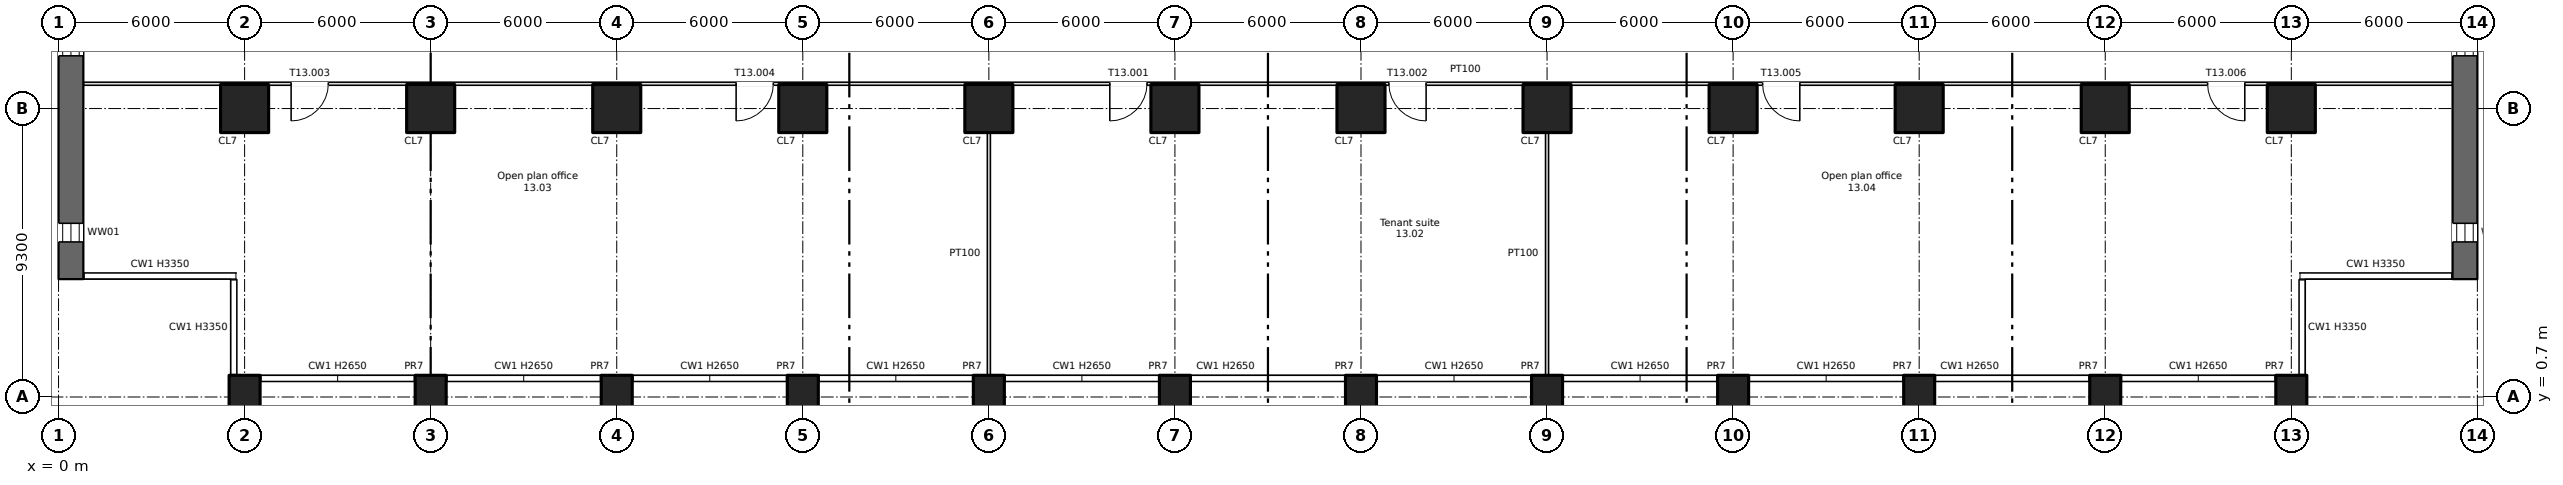
"""IFC4 building model, lengths in metres.
Left out: names, types, materials, properties, quantities, classifications, styles, units other than length and angle.
Written with IfcOpenShell. Run it as: python <this file> out.ifc"""

import sys

from ifc_helpers import new_model, si_unit, direction, frame, frame_2d, origin, origin_2d, place, context, subcontext, project, spatial, rectangle, extrude, element, fill, save


model = new_model("IFC4")
c1 = context("Model", 3, precision=1e-05, world=origin(), true_north=direction((0.0, 1.0)))
c2 = subcontext(c1, "Body", "Model", "MODEL_VIEW")
j1 = project(units=[si_unit("LENGTHUNIT", "METRE"), si_unit("PLANEANGLEUNIT", "RADIAN")], contexts=[c1])
p1 = place(None, origin())
s1 = spatial("IfcSite", under=j1, at=p1, CompositionType="ELEMENT")
p2 = place(p1, origin())
s2 = spatial("IfcBuilding", under=s1, at=p2, CompositionType="ELEMENT")
p3 = place(p2, frame((0.0, 0.0, 71.25)))
s3 = spatial("IfcBuildingStorey", under=s2, at=p3, CompositionType="ELEMENT", Elevation=71.25)
for number, where, z_axis, x_axis in (
    (1, (6.0, 0.7, -0.4), (0.0, 0.0, 1.0), (1.0, 0.0, 0.0)),
    (2, (12.0, 0.7, -0.4), (0.0, 0.0, 1.0), (1.0, 0.0, 0.0)),
    (3, (18.0, 0.7, -0.4), (0.0, 0.0, 1.0), (1.0, 0.0, 0.0)),
    (4, (24.0, 0.7, -0.4), (0.0, 0.0, 1.0), (1.0, 0.0, 0.0)),
    (5, (30.0, 0.7, -0.4), (0.0, 0.0, 1.0), (1.0, 0.0, 0.0)),
    (6, (36.0, 0.7, -0.4), (0.0, 0.0, 1.0), (1.0, 0.0, 0.0)),
    (7, (42.0, 0.7, -0.4), (0.0, 0.0, 1.0), (1.0, 0.0, 0.0)),
    (8, (48.0, 0.7, -0.4), (0.0, 0.0, 1.0), (1.0, 0.0, 0.0)),
    (9, (54.0, 0.7, -0.4), (0.0, 0.0, 1.0), (1.0, 0.0, 0.0)),
    (10, (60.0, 0.7, -0.4), (0.0, 0.0, 1.0), (1.0, 0.0, 0.0)),
    (11, (66.0, 0.7, -0.4), (0.0, 0.0, 1.0), (1.0, 0.0, 0.0)),
    (12, (72.0, 0.7, -0.4), (0.0, 0.0, 1.0), (1.0, 0.0, 0.0)),
):
    element("IfcColumn", number, at=place(p3, frame(where, z_axis=z_axis, x_axis=x_axis)), inside=s3, PredefinedType="COLUMN", context=c2, shape_type="SweptSolid", body=[
        extrude(rectangle(XDim=1.0, YDim=1.4, at=origin_2d()), origin(), (0.0, 0.0, 1.0), 3.75),
    ])
for number, where, z_axis, x_axis in (
    (13, (6.0, 10.0, 0.0), (0.0, 0.0, 1.0), (1.0, 0.0, 0.0)),
    (14, (12.0, 10.0, 0.0), (0.0, 0.0, 1.0), (1.0, 0.0, 0.0)),
    (15, (18.0, 10.0, 0.0), (0.0, 0.0, 1.0), (1.0, 0.0, 0.0)),
    (16, (24.0, 10.0, 0.0), (0.0, 0.0, 1.0), (1.0, 0.0, 0.0)),
    (17, (30.0, 10.0, 0.0), (0.0, 0.0, 1.0), (1.0, 0.0, 0.0)),
    (18, (36.0, 10.0, 0.0), (0.0, 0.0, 1.0), (1.0, 0.0, 0.0)),
    (19, (42.0, 10.0, 0.0), (0.0, 0.0, 1.0), (1.0, 0.0, 0.0)),
    (20, (48.0, 10.0, 0.0), (0.0, 0.0, 1.0), (1.0, 0.0, 0.0)),
    (21, (54.0, 10.0, 0.0), (0.0, 0.0, 1.0), (1.0, 0.0, 0.0)),
    (22, (60.0, 10.0, 0.0), (0.0, 0.0, 1.0), (1.0, 0.0, 0.0)),
    (23, (66.0, 10.0, 0.0), (0.0, 0.0, 1.0), (1.0, 0.0, 0.0)),
    (24, (72.0, 10.0, 0.0), (0.0, 0.0, 1.0), (1.0, 0.0, 0.0)),
):
    element("IfcColumn", number, at=place(p3, frame(where, z_axis=z_axis, x_axis=x_axis)), inside=s3, PredefinedType="COLUMN", context=c2, shape_type="SweptSolid", body=[
        extrude(rectangle(XDim=1.55, YDim=1.55, at=origin_2d()), origin(), (0.0, 0.0, 1.0), 3.35),
    ])
p4 = place(p3, frame((0.4, 4.5, 0.0), z_axis=(0.0, 0.0, 1.0), x_axis=(0.0, 1.0, 0.0)))
e25 = element("IfcWall", 25, at=p4, inside=s3, PredefinedType="SHEAR", context=c2, shape_type="SweptSolid", body=[
    extrude(rectangle(XDim=37.0, YDim=0.8, at=frame_2d((18.5, 0.0))), origin(), (0.0, 0.0, 1.0), 3.35),
])
p5 = place(p4, frame((1.2, 0.0, 0.6)))
e26 = element("IfcOpeningElement", 26, at=p5, cuts=e25, PredefinedType="OPENING", context=c2, shape_type="SweptSolid", body=[
    extrude(rectangle(XDim=0.6, YDim=2.4, at=frame_2d((0.3, 1.2))), frame((0.0, 0.41, 0.0), z_axis=(0.0, -1.0, 0.0), x_axis=(1.0, 0.0, 0.0)), (0.0, 0.0, 1.0), 0.82),
])
p6 = place(p4, frame((7.2, 0.0, 0.6)))
e27 = element("IfcOpeningElement", 27, at=p6, cuts=e25, PredefinedType="OPENING", context=c2, shape_type="SweptSolid", body=[
    extrude(rectangle(XDim=0.6, YDim=2.4, at=frame_2d((0.3, 1.2))), frame((0.0, 0.41, 0.0), z_axis=(0.0, -1.0, 0.0), x_axis=(1.0, 0.0, 0.0)), (0.0, 0.0, 1.0), 0.82),
])
p7 = place(p4, frame((13.2, 0.0, 0.6)))
e28 = element("IfcOpeningElement", 28, at=p7, cuts=e25, PredefinedType="OPENING", context=c2, shape_type="SweptSolid", body=[
    extrude(rectangle(XDim=0.6, YDim=2.4, at=frame_2d((0.3, 1.2))), frame((0.0, 0.41, 0.0), z_axis=(0.0, -1.0, 0.0), x_axis=(1.0, 0.0, 0.0)), (0.0, 0.0, 1.0), 0.82),
])
p8 = place(p4, frame((19.2, 0.0, 0.6)))
e29 = element("IfcOpeningElement", 29, at=p8, cuts=e25, PredefinedType="OPENING", context=c2, shape_type="SweptSolid", body=[
    extrude(rectangle(XDim=0.6, YDim=2.4, at=frame_2d((0.3, 1.2))), frame((0.0, 0.41, 0.0), z_axis=(0.0, -1.0, 0.0), x_axis=(1.0, 0.0, 0.0)), (0.0, 0.0, 1.0), 0.82),
])
p9 = place(p4, frame((25.2, 0.0, 0.6)))
e30 = element("IfcOpeningElement", 30, at=p9, cuts=e25, PredefinedType="OPENING", context=c2, shape_type="SweptSolid", body=[
    extrude(rectangle(XDim=0.6, YDim=2.4, at=frame_2d((0.3, 1.2))), frame((0.0, 0.41, 0.0), z_axis=(0.0, -1.0, 0.0), x_axis=(1.0, 0.0, 0.0)), (0.0, 0.0, 1.0), 0.82),
])
p10 = place(p4, frame((31.2, 0.0, 0.6)))
e31 = element("IfcOpeningElement", 31, at=p10, cuts=e25, PredefinedType="OPENING", context=c2, shape_type="SweptSolid", body=[
    extrude(rectangle(XDim=0.6, YDim=2.4, at=frame_2d((0.3, 1.2))), frame((0.0, 0.41, 0.0), z_axis=(0.0, -1.0, 0.0), x_axis=(1.0, 0.0, 0.0)), (0.0, 0.0, 1.0), 0.82),
])
p11 = place(p3, frame((77.6, 4.5, 0.0), z_axis=(0.0, 0.0, 1.0), x_axis=(0.0, 1.0, 0.0)))
e32 = element("IfcWall", 32, at=p11, inside=s3, PredefinedType="SHEAR", context=c2, shape_type="SweptSolid", body=[
    extrude(rectangle(XDim=37.0, YDim=0.8, at=frame_2d((18.5, 0.0))), origin(), (0.0, 0.0, 1.0), 3.35),
])
p12 = place(p11, frame((1.2, 0.0, 0.6)))
e33 = element("IfcOpeningElement", 33, at=p12, cuts=e32, PredefinedType="OPENING", context=c2, shape_type="SweptSolid", body=[
    extrude(rectangle(XDim=0.6, YDim=2.4, at=frame_2d((0.3, 1.2))), frame((0.0, 0.41, 0.0), z_axis=(0.0, -1.0, 0.0), x_axis=(1.0, 0.0, 0.0)), (0.0, 0.0, 1.0), 0.82),
])
p13 = place(p11, frame((7.2, 0.0, 0.6)))
e34 = element("IfcOpeningElement", 34, at=p13, cuts=e32, PredefinedType="OPENING", context=c2, shape_type="SweptSolid", body=[
    extrude(rectangle(XDim=0.6, YDim=2.4, at=frame_2d((0.3, 1.2))), frame((0.0, 0.41, 0.0), z_axis=(0.0, -1.0, 0.0), x_axis=(1.0, 0.0, 0.0)), (0.0, 0.0, 1.0), 0.82),
])
p14 = place(p11, frame((13.2, 0.0, 0.6)))
e35 = element("IfcOpeningElement", 35, at=p14, cuts=e32, PredefinedType="OPENING", context=c2, shape_type="SweptSolid", body=[
    extrude(rectangle(XDim=0.6, YDim=2.4, at=frame_2d((0.3, 1.2))), frame((0.0, 0.41, 0.0), z_axis=(0.0, -1.0, 0.0), x_axis=(1.0, 0.0, 0.0)), (0.0, 0.0, 1.0), 0.82),
])
p15 = place(p11, frame((19.2, 0.0, 0.6)))
e36 = element("IfcOpeningElement", 36, at=p15, cuts=e32, PredefinedType="OPENING", context=c2, shape_type="SweptSolid", body=[
    extrude(rectangle(XDim=0.6, YDim=2.4, at=frame_2d((0.3, 1.2))), frame((0.0, 0.41, 0.0), z_axis=(0.0, -1.0, 0.0), x_axis=(1.0, 0.0, 0.0)), (0.0, 0.0, 1.0), 0.82),
])
p16 = place(p11, frame((25.2, 0.0, 0.6)))
e37 = element("IfcOpeningElement", 37, at=p16, cuts=e32, PredefinedType="OPENING", context=c2, shape_type="SweptSolid", body=[
    extrude(rectangle(XDim=0.6, YDim=2.4, at=frame_2d((0.3, 1.2))), frame((0.0, 0.41, 0.0), z_axis=(0.0, -1.0, 0.0), x_axis=(1.0, 0.0, 0.0)), (0.0, 0.0, 1.0), 0.82),
])
p17 = place(p11, frame((31.2, 0.0, 0.6)))
e38 = element("IfcOpeningElement", 38, at=p17, cuts=e32, PredefinedType="OPENING", context=c2, shape_type="SweptSolid", body=[
    extrude(rectangle(XDim=0.6, YDim=2.4, at=frame_2d((0.3, 1.2))), frame((0.0, 0.41, 0.0), z_axis=(0.0, -1.0, 0.0), x_axis=(1.0, 0.0, 0.0)), (0.0, 0.0, 1.0), 0.82),
])
p18 = place(p3, frame((0.8, 10.8, 0.0), z_axis=(0.0, 0.0, 1.0), x_axis=(1.0, 0.0, 0.0)))
e39 = element("IfcWall", 39, at=p18, inside=s3, PredefinedType="PARTITIONING", context=c2, shape_type="SweptSolid", body=[
    extrude(rectangle(XDim=76.4, YDim=0.1, at=frame_2d((38.2, 0.0))), origin(), (0.0, 0.0, 1.0), 3.35),
])
p19 = place(p18, frame((33.1, 0.0, 0.0)))
e40 = element("IfcOpeningElement", 40, at=p19, cuts=e39, PredefinedType="OPENING", context=c2, shape_type="SweptSolid", body=[
    extrude(rectangle(XDim=1.2, YDim=2.1, at=frame_2d((0.6, 1.05))), frame((0.0, 0.06, 0.0), z_axis=(0.0, -1.0, 0.0), x_axis=(1.0, 0.0, 0.0)), (0.0, 0.0, 1.0), 0.12),
])
p20 = place(p18, frame((42.1, 0.0, 0.0)))
e41 = element("IfcOpeningElement", 41, at=p20, cuts=e39, PredefinedType="OPENING", context=c2, shape_type="SweptSolid", body=[
    extrude(rectangle(XDim=1.2, YDim=2.1, at=frame_2d((0.6, 1.05))), frame((0.0, 0.06, 0.0), z_axis=(0.0, -1.0, 0.0), x_axis=(1.0, 0.0, 0.0)), (0.0, 0.0, 1.0), 0.12),
])
p21 = place(p18, frame((6.7, 0.0, 0.0)))
e42 = element("IfcOpeningElement", 42, at=p21, cuts=e39, PredefinedType="OPENING", context=c2, shape_type="SweptSolid", body=[
    extrude(rectangle(XDim=1.2, YDim=2.1, at=frame_2d((0.6, 1.05))), frame((0.0, 0.06, 0.0), z_axis=(0.0, -1.0, 0.0), x_axis=(1.0, 0.0, 0.0)), (0.0, 0.0, 1.0), 0.12),
])
p22 = place(p18, frame((21.05, 0.0, 0.0)))
e43 = element("IfcOpeningElement", 43, at=p22, cuts=e39, PredefinedType="OPENING", context=c2, shape_type="SweptSolid", body=[
    extrude(rectangle(XDim=1.2, YDim=2.1, at=frame_2d((0.6, 1.05))), frame((0.0, 0.06, 0.0), z_axis=(0.0, -1.0, 0.0), x_axis=(1.0, 0.0, 0.0)), (0.0, 0.0, 1.0), 0.12),
])
p23 = place(p18, frame((54.15, 0.0, 0.0)))
e44 = element("IfcOpeningElement", 44, at=p23, cuts=e39, PredefinedType="OPENING", context=c2, shape_type="SweptSolid", body=[
    extrude(rectangle(XDim=1.2, YDim=2.1, at=frame_2d((0.6, 1.05))), frame((0.0, 0.06, 0.0), z_axis=(0.0, -1.0, 0.0), x_axis=(1.0, 0.0, 0.0)), (0.0, 0.0, 1.0), 0.12),
])
p24 = place(p18, frame((68.5, 0.0, 0.0)))
e45 = element("IfcOpeningElement", 45, at=p24, cuts=e39, PredefinedType="OPENING", context=c2, shape_type="SweptSolid", body=[
    extrude(rectangle(XDim=1.2, YDim=2.1, at=frame_2d((0.6, 1.05))), frame((0.0, 0.06, 0.0), z_axis=(0.0, -1.0, 0.0), x_axis=(1.0, 0.0, 0.0)), (0.0, 0.0, 1.0), 0.12),
])
for number, where, z_axis, x_axis in (
    (46, (30.0, 1.4, 0.0), (0.0, 0.0, 1.0), (0.0, 1.0, 0.0)),
    (47, (48.0, 1.4, 0.0), (0.0, 0.0, 1.0), (0.0, 1.0, 0.0)),
):
    element("IfcWall", number, at=place(p3, frame(where, z_axis=z_axis, x_axis=x_axis)), inside=s3, PredefinedType="PARTITIONING", context=c2, shape_type="SweptSolid", body=[
        extrude(rectangle(XDim=7.825, YDim=0.1, at=frame_2d((3.913, 0.0))), origin(), (0.0, 0.0, 1.0), 3.35),
    ])
p25 = place(p5, origin())
e48 = element("IfcWindow", 48, at=p25, inside=s3, PartitioningType="SINGLE_PANEL", PredefinedType="WINDOW", context=c2, shape_type="SweptSolid", body=[
    extrude(rectangle(XDim=0.6, YDim=2.4, at=frame_2d((0.3, 1.2))), frame((0.0, 0.03, 0.0), z_axis=(0.0, -1.0, 0.0), x_axis=(1.0, 0.0, 0.0)), (0.0, 0.0, 1.0), 0.06),
])
fill(e26, e48)
p26 = place(p6, origin())
e49 = element("IfcWindow", 49, at=p26, inside=s3, PartitioningType="SINGLE_PANEL", PredefinedType="WINDOW", context=c2, shape_type="SweptSolid", body=[
    extrude(rectangle(XDim=0.6, YDim=2.4, at=frame_2d((0.3, 1.2))), frame((0.0, 0.03, 0.0), z_axis=(0.0, -1.0, 0.0), x_axis=(1.0, 0.0, 0.0)), (0.0, 0.0, 1.0), 0.06),
])
fill(e27, e49)
p27 = place(p12, origin())
e50 = element("IfcWindow", 50, at=p27, inside=s3, PartitioningType="SINGLE_PANEL", PredefinedType="WINDOW", context=c2, shape_type="SweptSolid", body=[
    extrude(rectangle(XDim=0.6, YDim=2.4, at=frame_2d((0.3, 1.2))), frame((0.0, 0.03, 0.0), z_axis=(0.0, -1.0, 0.0), x_axis=(1.0, 0.0, 0.0)), (0.0, 0.0, 1.0), 0.06),
])
fill(e33, e50)
p28 = place(p13, origin())
e51 = element("IfcWindow", 51, at=p28, inside=s3, PartitioningType="SINGLE_PANEL", PredefinedType="WINDOW", context=c2, shape_type="SweptSolid", body=[
    extrude(rectangle(XDim=0.6, YDim=2.4, at=frame_2d((0.3, 1.2))), frame((0.0, 0.03, 0.0), z_axis=(0.0, -1.0, 0.0), x_axis=(1.0, 0.0, 0.0)), (0.0, 0.0, 1.0), 0.06),
])
fill(e34, e51)
p29 = place(p19, origin())
e52 = element("IfcDoor", 52, at=p29, inside=s3, OperationType="SINGLE_SWING_LEFT", PredefinedType="DOOR", context=c2, shape_type="SweptSolid", body=[
    extrude(rectangle(XDim=1.2, YDim=2.1, at=frame_2d((0.6, 1.05))), frame((0.0, 0.025, 0.0), z_axis=(0.0, -1.0, 0.0), x_axis=(1.0, 0.0, 0.0)), (0.0, 0.0, 1.0), 0.05),
])
fill(e40, e52)
p30 = place(p20, origin())
e53 = element("IfcDoor", 53, at=p30, inside=s3, OperationType="SINGLE_SWING_RIGHT", PredefinedType="DOOR", context=c2, shape_type="SweptSolid", body=[
    extrude(rectangle(XDim=1.2, YDim=2.1, at=frame_2d((0.6, 1.05))), frame((0.0, 0.025, 0.0), z_axis=(0.0, -1.0, 0.0), x_axis=(1.0, 0.0, 0.0)), (0.0, 0.0, 1.0), 0.05),
])
fill(e41, e53)
p31 = place(p21, origin())
e54 = element("IfcDoor", 54, at=p31, inside=s3, OperationType="SINGLE_SWING_LEFT", PredefinedType="DOOR", context=c2, shape_type="SweptSolid", body=[
    extrude(rectangle(XDim=1.2, YDim=2.1, at=frame_2d((0.6, 1.05))), frame((0.0, 0.025, 0.0), z_axis=(0.0, -1.0, 0.0), x_axis=(1.0, 0.0, 0.0)), (0.0, 0.0, 1.0), 0.05),
])
fill(e42, e54)
p32 = place(p22, origin())
e55 = element("IfcDoor", 55, at=p32, inside=s3, OperationType="SINGLE_SWING_LEFT", PredefinedType="DOOR", context=c2, shape_type="SweptSolid", body=[
    extrude(rectangle(XDim=1.2, YDim=2.1, at=frame_2d((0.6, 1.05))), frame((0.0, 0.025, 0.0), z_axis=(0.0, -1.0, 0.0), x_axis=(1.0, 0.0, 0.0)), (0.0, 0.0, 1.0), 0.05),
])
fill(e43, e55)
p33 = place(p23, origin())
e56 = element("IfcDoor", 56, at=p33, inside=s3, OperationType="SINGLE_SWING_RIGHT", PredefinedType="DOOR", context=c2, shape_type="SweptSolid", body=[
    extrude(rectangle(XDim=1.2, YDim=2.1, at=frame_2d((0.6, 1.05))), frame((0.0, 0.025, 0.0), z_axis=(0.0, -1.0, 0.0), x_axis=(1.0, 0.0, 0.0)), (0.0, 0.0, 1.0), 0.05),
])
fill(e44, e56)
p34 = place(p24, origin())
e57 = element("IfcDoor", 57, at=p34, inside=s3, OperationType="SINGLE_SWING_RIGHT", PredefinedType="DOOR", context=c2, shape_type="SweptSolid", body=[
    extrude(rectangle(XDim=1.2, YDim=2.1, at=frame_2d((0.6, 1.05))), frame((0.0, 0.025, 0.0), z_axis=(0.0, -1.0, 0.0), x_axis=(1.0, 0.0, 0.0)), (0.0, 0.0, 1.0), 0.05),
])
fill(e45, e57)
save(model, sys.argv[1])
